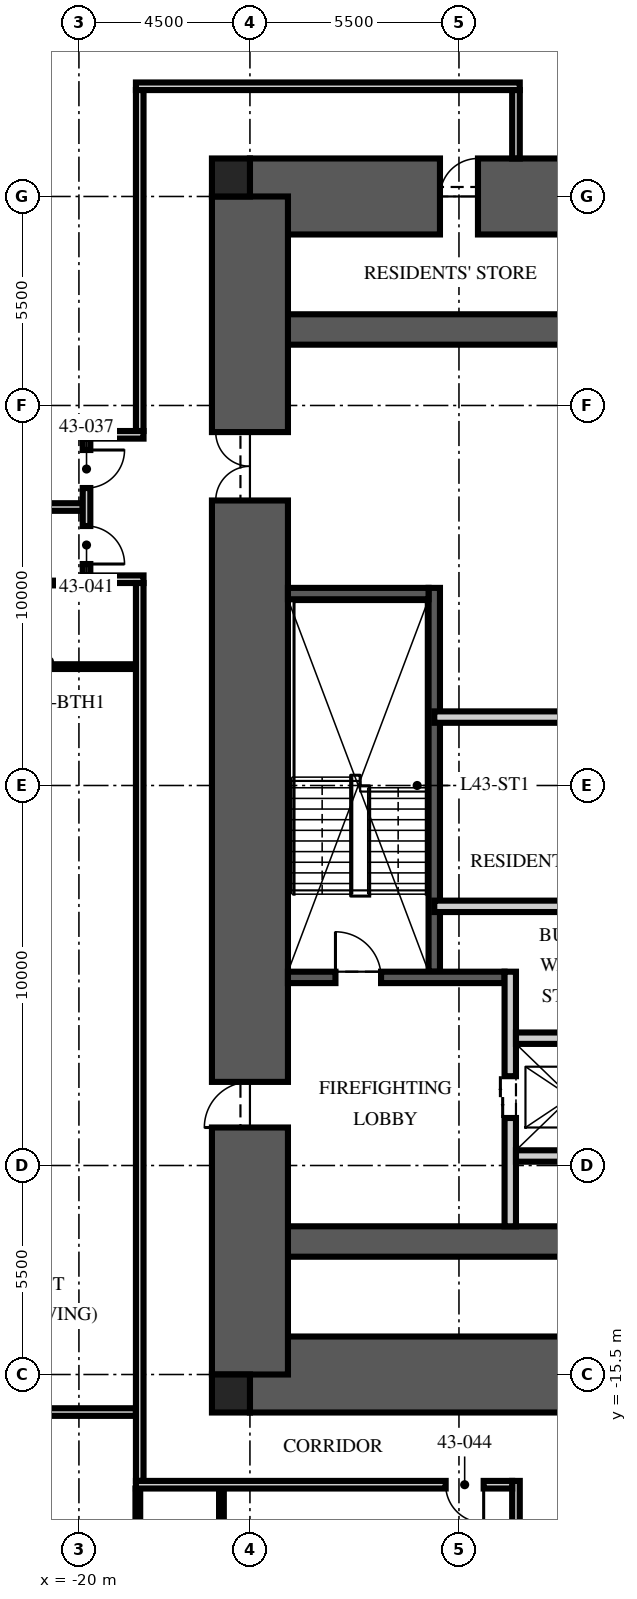
"""IFC4 building model, lengths in metres.
Left out: names, types, materials, properties, quantities, classifications, styles, units other than length and angle.
Written with IfcOpenShell. Run it as: python <this file> out.ifc"""

import sys

from ifc_helpers import new_model, si_unit, direction, frame, frame_2d, origin, origin_2d, place, context, subcontext, project, spatial, rectangle, extrude, element, fill, save


model = new_model("IFC4")
c1 = context("Model", 3, precision=1e-05, world=origin(), true_north=direction((0.0, 1.0)))
c2 = subcontext(c1, "Body", "Model", "MODEL_VIEW")
j1 = project(units=[si_unit("LENGTHUNIT", "METRE"), si_unit("PLANEANGLEUNIT", "RADIAN")], contexts=[c1])
p1 = place(None, origin())
s1 = spatial("IfcSite", under=j1, at=p1, CompositionType="ELEMENT")
p2 = place(p1, origin())
s2 = spatial("IfcBuilding", under=s1, at=p2, CompositionType="ELEMENT")
p3 = place(p2, frame((0.0, 0.0, 171.0)))
s3 = spatial("IfcBuildingStorey", under=s2, at=p3, CompositionType="ELEMENT", Elevation=171.0)
p4 = place(p3, frame((-15.5, 15.5, -0.25), z_axis=(0.0, 0.0, 1.0), x_axis=(1.0, 0.0, 0.0)))
e1 = element("IfcWall", 1, at=p4, inside=s3, PredefinedType="SHEAR", context=c2, shape_type="SweptSolid", body=[
    extrude(rectangle(XDim=31.0, YDim=2.0, at=frame_2d((15.5, 0.0))), origin(), (0.0, 0.0, 1.0), 3.75),
])
p5 = place(p4, frame((5.0, 0.0, 0.25)))
e2 = element("IfcOpeningElement", 2, at=p5, cuts=e1, PredefinedType="OPENING", context=c2, shape_type="SweptSolid", body=[
    extrude(rectangle(XDim=1.0, YDim=2.1, at=frame_2d((0.5, 1.05))), frame((0.0, 1.01, 0.0), z_axis=(0.0, -1.0, 0.0), x_axis=(1.0, 0.0, 0.0)), (0.0, 0.0, 1.0), 2.02),
])
p6 = place(p3, frame((-15.5, -15.5, -0.25), z_axis=(0.0, 0.0, 1.0), x_axis=(1.0, 0.0, 0.0)))
e3 = element("IfcWall", 3, at=p6, inside=s3, PredefinedType="SHEAR", context=c2, shape_type="SweptSolid", body=[
    extrude(rectangle(XDim=31.0, YDim=2.0, at=frame_2d((15.5, 0.0))), origin(), (0.0, 0.0, 1.0), 3.75),
])
p7 = place(p6, frame((10.4, 0.0, 0.25)))
e4 = element("IfcOpeningElement", 4, at=p7, cuts=e3, PredefinedType="OPENING", context=c2, shape_type="SweptSolid", body=[
    extrude(rectangle(XDim=1.1, YDim=2.1, at=frame_2d((0.55, 1.05))), frame((0.0, 1.01, 0.0), z_axis=(0.0, -1.0, 0.0), x_axis=(1.0, 0.0, 0.0)), (0.0, 0.0, 1.0), 2.02),
])
p8 = place(p6, frame((13.5, 0.0, 0.25)))
e5 = element("IfcOpeningElement", 5, at=p8, cuts=e3, PredefinedType="OPENING", context=c2, shape_type="SweptSolid", body=[
    extrude(rectangle(XDim=1.1, YDim=2.1, at=frame_2d((0.55, 1.05))), frame((0.0, 1.01, 0.0), z_axis=(0.0, -1.0, 0.0), x_axis=(1.0, 0.0, 0.0)), (0.0, 0.0, 1.0), 2.02),
])
p9 = place(p6, frame((16.6, 0.0, 0.25)))
e6 = element("IfcOpeningElement", 6, at=p9, cuts=e3, PredefinedType="OPENING", context=c2, shape_type="SweptSolid", body=[
    extrude(rectangle(XDim=1.1, YDim=2.1, at=frame_2d((0.55, 1.05))), frame((0.0, 1.01, 0.0), z_axis=(0.0, -1.0, 0.0), x_axis=(1.0, 0.0, 0.0)), (0.0, 0.0, 1.0), 2.02),
])
for number, where, z_axis, x_axis in (
    (7, (-15.5, 12.0, -0.25), (0.0, 0.0, 1.0), (1.0, 0.0, 0.0)),
    (8, (-15.5, -12.0, -0.25), (0.0, 0.0, 1.0), (1.0, 0.0, 0.0)),
):
    element("IfcWall", number, at=place(p3, frame(where, z_axis=z_axis, x_axis=x_axis)), inside=s3, PredefinedType="SHEAR", context=c2, shape_type="SweptSolid", body=[
        extrude(rectangle(XDim=31.0, YDim=0.8, at=frame_2d((15.5, 0.0))), origin(), (0.0, 0.0, 1.0), 3.75),
    ])
p10 = place(p3, frame((-15.5, -15.5, -0.25), z_axis=(0.0, 0.0, 1.0), x_axis=(0.0, 1.0, 0.0)))
e9 = element("IfcWall", 9, at=p10, inside=s3, PredefinedType="SHEAR", context=c2, shape_type="SweptSolid", body=[
    extrude(rectangle(XDim=31.0, YDim=2.0, at=frame_2d((15.5, 0.0))), origin(), (0.0, 0.0, 1.0), 3.75),
])
p11 = place(p10, frame((6.5, 0.0, 0.25)))
e10 = element("IfcOpeningElement", 10, at=p11, cuts=e9, PredefinedType="OPENING", context=c2, shape_type="SweptSolid", body=[
    extrude(rectangle(XDim=1.2, YDim=2.1, at=frame_2d((0.6, 1.05))), frame((0.0, 1.01, 0.0), z_axis=(0.0, -1.0, 0.0), x_axis=(1.0, 0.0, 0.0)), (0.0, 0.0, 1.0), 2.02),
])
p12 = place(p10, frame((23.0, 0.0, 0.25)))
e11 = element("IfcOpeningElement", 11, at=p12, cuts=e9, PredefinedType="OPENING", context=c2, shape_type="SweptSolid", body=[
    extrude(rectangle(XDim=1.8, YDim=2.1, at=frame_2d((0.9, 1.05))), frame((0.0, 1.01, 0.0), z_axis=(0.0, -1.0, 0.0), x_axis=(1.0, 0.0, 0.0)), (0.0, 0.0, 1.0), 2.02),
])
for number, where, z_axis, x_axis in (
    (12, (-16.0, 16.0, -0.25), (0.0, 0.0, 1.0), (1.0, 0.0, 0.0)),
    (13, (-16.0, -16.0, -0.25), (0.0, 0.0, 1.0), (1.0, 0.0, 0.0)),
):
    element("IfcColumn", number, at=place(p3, frame(where, z_axis=z_axis, x_axis=x_axis)), inside=s3, PredefinedType="COLUMN", context=c2, shape_type="SweptSolid", body=[
        extrude(rectangle(XDim=1.0, YDim=1.0, at=origin_2d()), origin(), (0.0, 0.0, 1.0), 3.75),
    ])
p13 = place(p3, frame((-10.65, -4.9, 0.0), z_axis=(0.0, 0.0, 1.0), x_axis=(0.0, 1.0, 0.0)))
e14 = element("IfcWall", 14, at=p13, inside=s3, PredefinedType="SOLIDWALL", context=c2, shape_type="SweptSolid", body=[
    extrude(rectangle(XDim=10.1, YDim=0.3, at=frame_2d((5.05, 0.0))), origin(), (0.0, 0.0, 1.0), 3.5),
])
p14 = place(p3, frame((-14.5, -5.05, 0.0), z_axis=(0.0, 0.0, 1.0), x_axis=(1.0, 0.0, 0.0)))
e15 = element("IfcWall", 15, at=p14, inside=s3, PredefinedType="SOLIDWALL", context=c2, shape_type="SweptSolid", body=[
    extrude(rectangle(XDim=5.7, YDim=0.3, at=frame_2d((2.85, 0.0))), origin(), (0.0, 0.0, 1.0), 3.5),
])
p15 = place(p14, frame((1.25, 0.0, 0.0)))
e16 = element("IfcOpeningElement", 16, at=p15, cuts=e15, PredefinedType="OPENING", context=c2, shape_type="SweptSolid", body=[
    extrude(rectangle(XDim=1.2, YDim=2.1, at=frame_2d((0.6, 1.05))), frame((0.0, 0.16, 0.0), z_axis=(0.0, -1.0, 0.0), x_axis=(1.0, 0.0, 0.0)), (0.0, 0.0, 1.0), 0.32),
])
p16 = place(p3, frame((-14.5, 5.05, 0.0), z_axis=(0.0, 0.0, 1.0), x_axis=(1.0, 0.0, 0.0)))
e17 = element("IfcWall", 17, at=p16, inside=s3, PredefinedType="SOLIDWALL", context=c2, shape_type="SweptSolid", body=[
    extrude(rectangle(XDim=3.7, YDim=0.3, at=frame_2d((1.85, 0.0))), origin(), (0.0, 0.0, 1.0), 3.5),
])
p17 = place(p3, frame((-8.65, -11.6, 0.0), z_axis=(0.0, 0.0, 1.0), x_axis=(0.0, 1.0, 0.0)))
e18 = element("IfcWall", 18, at=p17, inside=s3, PredefinedType="PARTITIONING", context=c2, shape_type="SweptSolid", body=[
    extrude(rectangle(XDim=6.7, YDim=0.3, at=frame_2d((3.35, 0.0))), origin(), (0.0, 0.0, 1.0), 3.5),
])
p18 = place(p17, frame((2.85, 0.0, 0.0)))
e19 = element("IfcOpeningElement", 19, at=p18, cuts=e18, PredefinedType="OPENING", context=c2, shape_type="SweptSolid", body=[
    extrude(rectangle(XDim=1.1, YDim=2.1, at=frame_2d((0.55, 1.05))), frame((0.0, 0.16, 0.0), z_axis=(0.0, -1.0, 0.0), x_axis=(1.0, 0.0, 0.0)), (0.0, 0.0, 1.0), 0.32),
])
p19 = place(p3, frame((-8.5, -6.65, 0.0), z_axis=(0.0, 0.0, 1.0), x_axis=(1.0, 0.0, 0.0)))
e20 = element("IfcWall", 20, at=p19, inside=s3, PredefinedType="PARTITIONING", context=c2, shape_type="SweptSolid", body=[
    extrude(rectangle(XDim=17.0, YDim=0.3, at=frame_2d((8.5, 0.0))), origin(), (0.0, 0.0, 1.0), 3.5),
])
p20 = place(p19, frame((7.8, 0.0, 0.0)))
e21 = element("IfcOpeningElement", 21, at=p20, cuts=e20, PredefinedType="OPENING", context=c2, shape_type="SweptSolid", body=[
    extrude(rectangle(XDim=1.3, YDim=2.4, at=frame_2d((0.65, 1.2))), frame((0.0, 0.16, 0.0), z_axis=(0.0, -1.0, 0.0), x_axis=(1.0, 0.0, 0.0)), (0.0, 0.0, 1.0), 0.32),
])
p21 = place(p19, frame((5.65, 0.0, 0.0)))
e22 = element("IfcOpeningElement", 22, at=p21, cuts=e20, PredefinedType="OPENING", context=c2, shape_type="SweptSolid", body=[
    extrude(rectangle(XDim=0.9, YDim=2.1, at=frame_2d((0.45, 1.05))), frame((0.0, 0.16, 0.0), z_axis=(0.0, -1.0, 0.0), x_axis=(1.0, 0.0, 0.0)), (0.0, 0.0, 1.0), 0.32),
])
p22 = place(p19, frame((10.4, 0.0, 0.0)))
e23 = element("IfcOpeningElement", 23, at=p22, cuts=e20, PredefinedType="OPENING", context=c2, shape_type="SweptSolid", body=[
    extrude(rectangle(XDim=0.9, YDim=2.1, at=frame_2d((0.45, 1.05))), frame((0.0, 0.16, 0.0), z_axis=(0.0, -1.0, 0.0), x_axis=(1.0, 0.0, 0.0)), (0.0, 0.0, 1.0), 0.32),
])
p23 = place(p3, frame((-8.5, -9.75, 0.0), z_axis=(0.0, 0.0, 1.0), x_axis=(1.0, 0.0, 0.0)))
e24 = element("IfcWall", 24, at=p23, inside=s3, PredefinedType="PARTITIONING", context=c2, shape_type="SweptSolid", body=[
    extrude(rectangle(XDim=2.9, YDim=0.3, at=frame_2d((1.45, 0.0))), origin(), (0.0, 0.0, 1.0), 3.5),
])
p24 = place(p3, frame((-10.65, 1.8, 0.0), z_axis=(0.0, 0.0, 1.0), x_axis=(1.0, 0.0, 0.0)))
e25 = element("IfcWall", 25, at=p24, inside=s3, PredefinedType="PARTITIONING", context=c2, shape_type="SweptSolid", body=[
    extrude(rectangle(XDim=21.3, YDim=0.3, at=frame_2d((10.65, 0.0))), origin(), (0.0, 0.0, 1.0), 3.5),
])
p25 = place(p24, frame((10.05, 0.0, 0.0)))
e26 = element("IfcOpeningElement", 26, at=p25, cuts=e25, PredefinedType="OPENING", context=c2, shape_type="SweptSolid", body=[
    extrude(rectangle(XDim=1.2, YDim=2.1, at=frame_2d((0.6, 1.05))), frame((0.0, 0.16, 0.0), z_axis=(0.0, -1.0, 0.0), x_axis=(1.0, 0.0, 0.0)), (0.0, 0.0, 1.0), 0.32),
])
p26 = place(p24, frame((19.238, 0.0, 0.0)))
e27 = element("IfcOpeningElement", 27, at=p26, cuts=e25, PredefinedType="OPENING", context=c2, shape_type="SweptSolid", body=[
    extrude(rectangle(XDim=0.9, YDim=2.1, at=frame_2d((0.45, 1.05))), frame((0.0, 0.16, 0.0), z_axis=(0.0, -1.0, 0.0), x_axis=(1.0, 0.0, 0.0)), (0.0, 0.0, 1.0), 0.32),
])
p27 = place(p3, frame((-10.65, -3.18, 0.0), z_axis=(0.0, 0.0, 1.0), x_axis=(1.0, 0.0, 0.0)))
e28 = element("IfcWall", 28, at=p27, inside=s3, PredefinedType="PARTITIONING", context=c2, shape_type="SweptSolid", body=[
    extrude(rectangle(XDim=6.45, YDim=0.3, at=frame_2d((3.225, 0.0))), origin(), (0.0, 0.0, 1.0), 3.5),
])
p28 = place(p3, frame((-18.5, 18.4, 0.0), z_axis=(0.0, 0.0, 1.0), x_axis=(1.0, 0.0, 0.0)))
e29 = element("IfcWall", 29, at=p28, inside=s3, PredefinedType="PARTITIONING", context=c2, shape_type="SweptSolid", body=[
    extrude(rectangle(XDim=10.1, YDim=0.2, at=frame_2d((5.05, 0.0))), origin(), (0.0, 0.0, 1.0), 2.3),
])
p29 = place(p3, frame((-8.5, 18.3, 0.0), z_axis=(0.0, 0.0, 1.0), x_axis=(0.0, -1.0, 0.0)))
e30 = element("IfcWall", 30, at=p29, inside=s3, PredefinedType="PARTITIONING", context=c2, shape_type="SweptSolid", body=[
    extrude(rectangle(XDim=1.8, YDim=0.2, at=frame_2d((0.9, 0.0))), origin(), (0.0, 0.0, 1.0), 3.5),
])
p30 = place(p3, frame((-19.9, 7.328, 0.0), z_axis=(0.0, 0.0, 1.0), x_axis=(-1.0, 0.0, 0.0)))
e31 = element("IfcWall", 31, at=p30, inside=s3, PredefinedType="PARTITIONING", context=c2, shape_type="SweptSolid", body=[
    extrude(rectangle(XDim=8.25, YDim=0.2, at=frame_2d((4.125, 0.0))), origin(), (0.0, 0.0, 1.0), 2.81),
])
p31 = place(p3, frame((-18.5, -16.488, 0.0), z_axis=(0.0, 0.0, 1.0), x_axis=(-1.0, 0.0, 0.0)))
e32 = element("IfcWall", 32, at=p31, inside=s3, PredefinedType="PARTITIONING", context=c2, shape_type="SweptSolid", body=[
    extrude(rectangle(XDim=9.65, YDim=0.2, at=frame_2d((4.825, 0.0))), origin(), (0.0, 0.0, 1.0), 2.81),
])
p32 = place(p3, frame((-19.97, 5.328, 0.0), z_axis=(0.0, 0.0, 1.0), x_axis=(-1.0, 0.0, 0.0)))
e33 = element("IfcWall", 33, at=p32, inside=s3, PredefinedType="PARTITIONING", context=c2, shape_type="SweptSolid", body=[
    extrude(rectangle(XDim=2.48, YDim=0.125, at=frame_2d((1.24, 0.0))), origin(), (0.0, 0.0, 1.0), 3.5),
])
p33 = place(p3, frame((-18.5, 3.128, 0.0), z_axis=(0.0, 0.0, 1.0), x_axis=(-1.0, 0.0, 0.0)))
e34 = element("IfcWall", 34, at=p33, inside=s3, PredefinedType="PARTITIONING", context=c2, shape_type="SweptSolid", body=[
    extrude(rectangle(XDim=3.95, YDim=0.125, at=frame_2d((1.975, 0.0))), origin(), (0.0, 0.0, 1.0), 3.5),
])
p34 = place(p3, frame((-18.45, -18.5, 0.0), z_axis=(0.0, 0.0, 1.0), x_axis=(0.0, -1.0, 0.0)))
e35 = element("IfcWall", 35, at=p34, inside=s3, PredefinedType="PARTITIONING", context=c2, shape_type="SweptSolid", body=[
    extrude(rectangle(XDim=3.95, YDim=0.125, at=frame_2d((1.975, 0.0))), origin(), (0.0, 0.0, 1.0), 2.3),
])
p35 = place(p3, frame((-16.25, -18.5, 0.0), z_axis=(0.0, 0.0, 1.0), x_axis=(0.0, -1.0, 0.0)))
e36 = element("IfcWall", 36, at=p35, inside=s3, PredefinedType="PARTITIONING", context=c2, shape_type="SweptSolid", body=[
    extrude(rectangle(XDim=3.95, YDim=0.125, at=frame_2d((1.975, 0.0))), origin(), (0.0, 0.0, 1.0), 3.5),
])
p36 = place(p3, frame((-18.4, 18.3, 0.0), z_axis=(0.0, 0.0, 1.0), x_axis=(0.0, -1.0, 0.0)))
e37 = element("IfcWall", 37, at=p36, inside=s3, PredefinedType="PARTITIONING", context=c2, shape_type="SweptSolid", body=[
    extrude(rectangle(XDim=8.972, YDim=0.2, at=frame_2d((4.486, 0.0))), origin(), (0.0, 0.0, 1.0), 2.3),
])
p37 = place(p3, frame((-18.3, 9.228, 0.0), z_axis=(0.0, 0.0, 1.0), x_axis=(-1.0, 0.0, 0.0)))
e38 = element("IfcWall", 38, at=p37, inside=s3, PredefinedType="PARTITIONING", context=c2, shape_type="SweptSolid", body=[
    extrude(rectangle(XDim=1.6, YDim=0.2, at=frame_2d((0.8, 0.0))), origin(), (0.0, 0.0, 1.0), 2.7),
])
p38 = place(p3, frame((-18.3, 5.428, 0.0), z_axis=(0.0, 0.0, 1.0), x_axis=(-1.0, 0.0, 0.0)))
e39 = element("IfcWall", 39, at=p38, inside=s3, PredefinedType="PARTITIONING", context=c2, shape_type="SweptSolid", body=[
    extrude(rectangle(XDim=1.6, YDim=0.2, at=frame_2d((0.8, 0.0))), origin(), (0.0, 0.0, 1.0), 3.5),
])
p39 = place(p3, frame((-19.8, 9.128, 0.0), z_axis=(0.0, 0.0, 1.0), x_axis=(0.0, -1.0, 0.0)))
e40 = element("IfcWall", 40, at=p39, inside=s3, PredefinedType="PARTITIONING", context=c2, shape_type="SweptSolid", body=[
    extrude(rectangle(XDim=3.6, YDim=0.2, at=frame_2d((1.8, 0.0))), origin(), (0.0, 0.0, 1.0), 2.7),
])
p40 = place(p39, frame((0.3, 0.0, 0.0)))
e41 = element("IfcOpeningElement", 41, at=p40, cuts=e40, PredefinedType="OPENING", context=c2, shape_type="SweptSolid", body=[
    extrude(rectangle(XDim=1.0, YDim=2.2, at=frame_2d((0.5, 1.1))), frame((0.0, 0.11, 0.0), z_axis=(0.0, -1.0, 0.0), x_axis=(1.0, 0.0, 0.0)), (0.0, 0.0, 1.0), 0.22),
])
p41 = place(p39, frame((2.3, 0.0, 0.0)))
e42 = element("IfcOpeningElement", 42, at=p41, cuts=e40, PredefinedType="OPENING", context=c2, shape_type="SweptSolid", body=[
    extrude(rectangle(XDim=1.0, YDim=2.2, at=frame_2d((0.5, 1.1))), frame((0.0, 0.11, 0.0), z_axis=(0.0, -1.0, 0.0), x_axis=(1.0, 0.0, 0.0)), (0.0, 0.0, 1.0), 0.22),
])
p42 = place(p3, frame((-18.4, 5.328, 0.0), z_axis=(0.0, 0.0, 1.0), x_axis=(0.0, -1.0, 0.0)))
e43 = element("IfcWall", 43, at=p42, inside=s3, PredefinedType="PARTITIONING", context=c2, shape_type="SweptSolid", body=[
    extrude(rectangle(XDim=23.628, YDim=0.2, at=frame_2d((11.814, 0.0))), origin(), (0.0, 0.0, 1.0), 2.3),
])
p43 = place(p3, frame((-8.5, -18.3, 0.0), z_axis=(0.0, 0.0, 1.0), x_axis=(0.0, -1.0, 0.0)))
e44 = element("IfcWall", 44, at=p43, inside=s3, PredefinedType="PARTITIONING", context=c2, shape_type="SweptSolid", body=[
    extrude(rectangle(XDim=3.0, YDim=0.2, at=frame_2d((1.5, 0.0))), origin(), (0.0, 0.0, 1.0), 3.5),
])
p44 = place(p3, frame((-8.6, -18.4, 0.0), z_axis=(0.0, 0.0, 1.0), x_axis=(-1.0, 0.0, 0.0)))
e45 = element("IfcWall", 45, at=p44, inside=s3, PredefinedType="PARTITIONING", context=c2, shape_type="SweptSolid", body=[
    extrude(rectangle(XDim=9.9, YDim=0.2, at=frame_2d((4.95, 0.0))), origin(), (0.0, 0.0, 1.0), 2.3),
])
p45 = place(p44, frame((0.75, 0.0, 0.0)))
e46 = element("IfcOpeningElement", 46, at=p45, cuts=e45, PredefinedType="OPENING", context=c2, shape_type="SweptSolid", body=[
    extrude(rectangle(XDim=1.0, YDim=2.2, at=frame_2d((0.5, 1.1))), frame((0.0, 0.11, 0.0), z_axis=(0.0, -1.0, 0.0), x_axis=(1.0, 0.0, 0.0)), (0.0, 0.0, 1.0), 0.22),
])
p46 = place(p15, origin())
e47 = element("IfcDoor", 47, at=p46, inside=s3, OperationType="SINGLE_SWING_LEFT", PredefinedType="DOOR", context=c2, shape_type="SweptSolid", body=[
    extrude(rectangle(XDim=1.2, YDim=2.1, at=frame_2d((0.6, 1.05))), frame((0.0, 0.025, 0.0), z_axis=(0.0, -1.0, 0.0), x_axis=(1.0, 0.0, 0.0)), (0.0, 0.0, 1.0), 0.05),
])
fill(e16, e47)
p47 = place(p11, origin())
e48 = element("IfcDoor", 48, at=p47, inside=s3, OperationType="SINGLE_SWING_LEFT", PredefinedType="DOOR", context=c2, shape_type="SweptSolid", body=[
    extrude(rectangle(XDim=1.2, YDim=2.1, at=frame_2d((0.6, 1.05))), frame((0.0, 0.025, 0.0), z_axis=(0.0, -1.0, 0.0), x_axis=(1.0, 0.0, 0.0)), (0.0, 0.0, 1.0), 0.05),
])
fill(e10, e48)
p48 = place(p12, origin())
e49 = element("IfcDoor", 49, at=p48, inside=s3, OperationType="DOUBLE_DOOR_SINGLE_SWING", PredefinedType="DOOR", context=c2, shape_type="SweptSolid", body=[
    extrude(rectangle(XDim=1.8, YDim=2.1, at=frame_2d((0.9, 1.05))), frame((0.0, 0.025, 0.0), z_axis=(0.0, -1.0, 0.0), x_axis=(1.0, 0.0, 0.0)), (0.0, 0.0, 1.0), 0.05),
])
fill(e11, e49)
p49 = place(p18, origin())
e50 = element("IfcDoor", 50, at=p49, inside=s3, OperationType="DOUBLE_DOOR_SLIDING", PredefinedType="DOOR", context=c2, shape_type="SweptSolid", body=[
    extrude(rectangle(XDim=1.1, YDim=2.1, at=frame_2d((0.55, 1.05))), frame((0.0, 0.025, 0.0), z_axis=(0.0, -1.0, 0.0), x_axis=(1.0, 0.0, 0.0)), (0.0, 0.0, 1.0), 0.05),
])
fill(e19, e50)
p50 = place(p5, origin())
e51 = element("IfcDoor", 51, at=p50, inside=s3, OperationType="SINGLE_SWING_RIGHT", PredefinedType="DOOR", context=c2, shape_type="SweptSolid", body=[
    extrude(rectangle(XDim=1.0, YDim=2.1, at=frame_2d((0.5, 1.05))), frame((0.0, 0.025, 0.0), z_axis=(0.0, -1.0, 0.0), x_axis=(1.0, 0.0, 0.0)), (0.0, 0.0, 1.0), 0.05),
])
fill(e2, e51)
p51 = place(p40, origin())
e52 = element("IfcDoor", 52, at=p51, inside=s3, OperationType="SINGLE_SWING_LEFT", PredefinedType="DOOR", context=c2, shape_type="SweptSolid", body=[
    extrude(rectangle(XDim=1.0, YDim=2.2, at=frame_2d((0.5, 1.1))), frame((0.0, 0.025, 0.0), z_axis=(0.0, -1.0, 0.0), x_axis=(1.0, 0.0, 0.0)), (0.0, 0.0, 1.0), 0.05),
])
fill(e41, e52)
p52 = place(p41, origin())
e53 = element("IfcDoor", 53, at=p52, inside=s3, OperationType="SINGLE_SWING_RIGHT", PredefinedType="DOOR", context=c2, shape_type="SweptSolid", body=[
    extrude(rectangle(XDim=1.0, YDim=2.2, at=frame_2d((0.5, 1.1))), frame((0.0, 0.025, 0.0), z_axis=(0.0, -1.0, 0.0), x_axis=(1.0, 0.0, 0.0)), (0.0, 0.0, 1.0), 0.05),
])
fill(e42, e53)
p53 = place(p45, origin())
e54 = element("IfcDoor", 54, at=p53, inside=s3, OperationType="SINGLE_SWING_LEFT", PredefinedType="DOOR", context=c2, shape_type="SweptSolid", body=[
    extrude(rectangle(XDim=1.0, YDim=2.2, at=frame_2d((0.5, 1.1))), frame((0.0, 0.025, 0.0), z_axis=(0.0, -1.0, 0.0), x_axis=(1.0, 0.0, 0.0)), (0.0, 0.0, 1.0), 0.05),
])
fill(e46, e54)
save(model, sys.argv[1])
